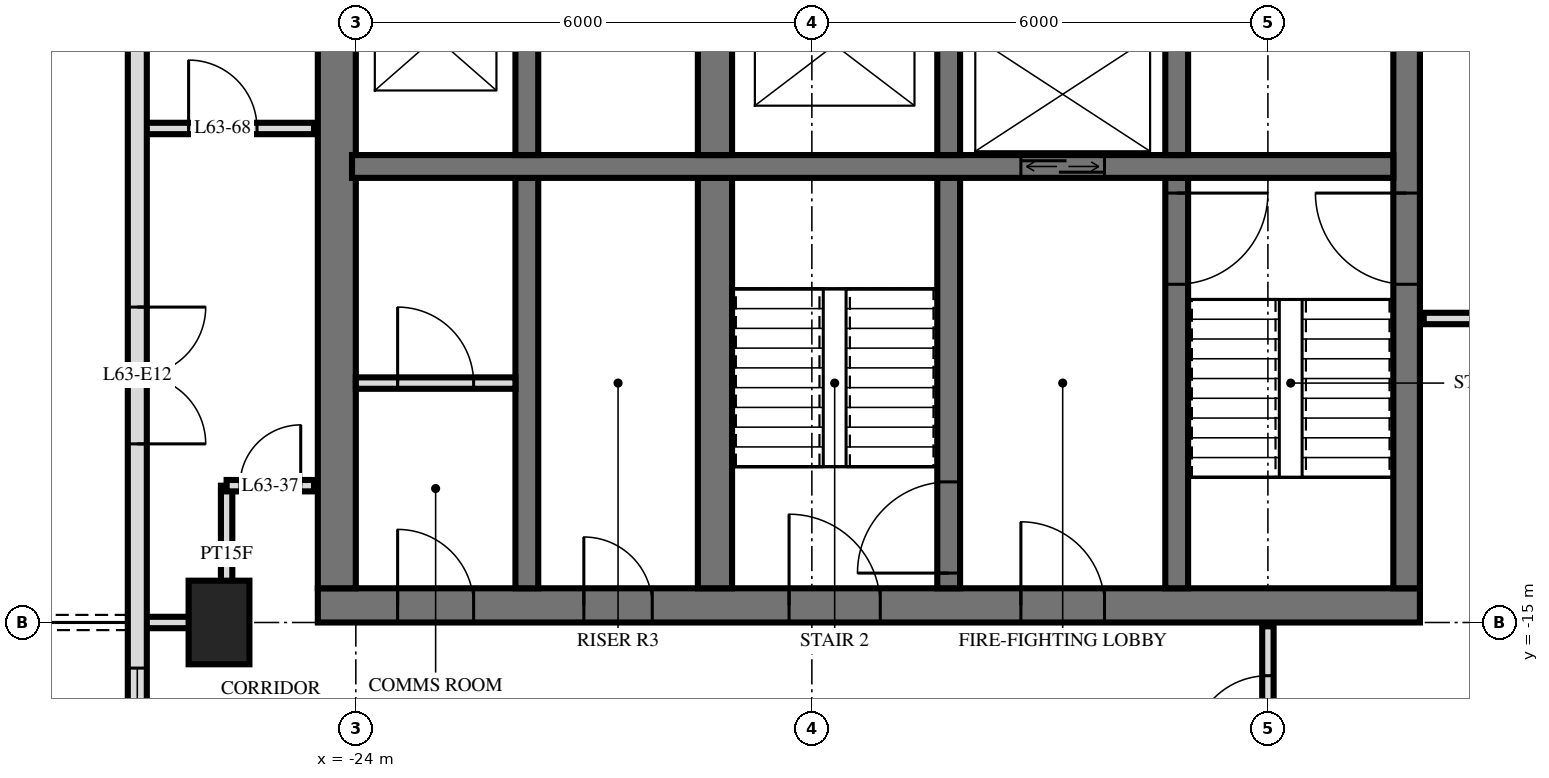
"""IFC4 building model, lengths in metres.
Left out: names, types, materials, properties, quantities, classifications, styles, units other than length and angle.
Written with IfcOpenShell. Run it as: python <this file> out.ifc"""

import sys

from ifc_helpers import new_model, si_unit, direction, frame, frame_2d, origin, origin_2d, place, context, subcontext, project, spatial, rectangle, extrude, element, fill, save


model = new_model("IFC4")
c1 = context("Model", 3, precision=1e-05, world=origin(), true_north=direction((0.0, 1.0)))
c2 = subcontext(c1, "Body", "Model", "MODEL_VIEW")
j1 = project(units=[si_unit("LENGTHUNIT", "METRE"), si_unit("PLANEANGLEUNIT", "RADIAN")], contexts=[c1])
p1 = place(None, origin())
s1 = spatial("IfcSite", under=j1, at=p1, CompositionType="ELEMENT")
p2 = place(p1, origin())
s2 = spatial("IfcBuilding", under=s1, at=p2, CompositionType="ELEMENT")
p3 = place(p2, frame((0.0, 0.0, 239.6)))
s3 = spatial("IfcBuildingStorey", under=s2, at=p3, CompositionType="ELEMENT", Elevation=239.6)
p4 = place(p3, frame((-25.8, -15.0, 0.0), z_axis=(0.0, 0.0, 1.0), x_axis=(0.0, 1.0, 0.0)))
e1 = element("IfcColumn", 1, at=p4, inside=s3, PredefinedType="COLUMN", context=c2, shape_type="SweptSolid", body=[
    extrude(rectangle(XDim=1.1, YDim=0.8, at=origin_2d()), origin(), (0.0, 0.0, 1.0), 3.5),
])
p5 = place(p3, frame((-24.5, -14.775, 0.0), z_axis=(0.0, 0.0, 1.0), x_axis=(1.0, 0.0, 0.0)))
e2 = element("IfcWall", 2, at=p5, inside=s3, PredefinedType="SHEAR", context=c2, shape_type="SweptSolid", body=[
    extrude(rectangle(XDim=14.5, YDim=0.45, at=frame_2d((7.25, 0.0))), origin(), (0.0, 0.0, 1.0), 3.5),
])
p6 = place(p5, frame((6.2, 0.0, 0.0)))
e3 = element("IfcOpeningElement", 3, at=p6, cuts=e2, PredefinedType="OPENING", context=c2, shape_type="SweptSolid", body=[
    extrude(rectangle(XDim=1.2, YDim=2.1, at=frame_2d((0.6, 1.05))), frame((0.0, 0.235, 0.0), z_axis=(0.0, -1.0, 0.0), x_axis=(1.0, 0.0, 0.0)), (0.0, 0.0, 1.0), 0.47),
])
p7 = place(p5, frame((9.25, 0.0, 0.0)))
e4 = element("IfcOpeningElement", 4, at=p7, cuts=e2, PredefinedType="OPENING", context=c2, shape_type="SweptSolid", body=[
    extrude(rectangle(XDim=1.1, YDim=2.1, at=frame_2d((0.55, 1.05))), frame((0.0, 0.235, 0.0), z_axis=(0.0, -1.0, 0.0), x_axis=(1.0, 0.0, 0.0)), (0.0, 0.0, 1.0), 0.47),
])
p8 = place(p5, frame((3.5, 0.0, 0.0)))
e5 = element("IfcOpeningElement", 5, at=p8, cuts=e2, PredefinedType="OPENING", context=c2, shape_type="SweptSolid", body=[
    extrude(rectangle(XDim=0.9, YDim=2.1, at=frame_2d((0.45, 1.05))), frame((0.0, 0.235, 0.0), z_axis=(0.0, -1.0, 0.0), x_axis=(1.0, 0.0, 0.0)), (0.0, 0.0, 1.0), 0.47),
])
p9 = place(p5, frame((1.05, 0.0, 0.0)))
e6 = element("IfcOpeningElement", 6, at=p9, cuts=e2, PredefinedType="OPENING", context=c2, shape_type="SweptSolid", body=[
    extrude(rectangle(XDim=1.0, YDim=2.1, at=frame_2d((0.5, 1.05))), frame((0.0, 0.235, 0.0), z_axis=(0.0, -1.0, 0.0), x_axis=(1.0, 0.0, 0.0)), (0.0, 0.0, 1.0), 0.47),
])
p10 = place(p3, frame((-10.175, -14.55, 0.0), z_axis=(0.0, 0.0, 1.0), x_axis=(0.0, 1.0, 0.0)))
e7 = element("IfcWall", 7, at=p10, inside=s3, PredefinedType="SHEAR", context=c2, shape_type="SweptSolid", body=[
    extrude(rectangle(XDim=14.1, YDim=0.35, at=frame_2d((7.05, 0.0))), origin(), (0.0, 0.0, 1.0), 3.5),
])
p11 = place(p10, frame((8.4, 0.0, 0.0)))
e8 = element("IfcOpeningElement", 8, at=p11, cuts=e7, PredefinedType="OPENING", context=c2, shape_type="SweptSolid", body=[
    extrude(rectangle(XDim=1.4, YDim=2.4, at=frame_2d((0.7, 1.2))), frame((0.0, 0.185, 0.0), z_axis=(0.0, -1.0, 0.0), x_axis=(1.0, 0.0, 0.0)), (0.0, 0.0, 1.0), 0.37),
])
p12 = place(p10, frame((10.0, 0.0, 0.0)))
e9 = element("IfcOpeningElement", 9, at=p12, cuts=e7, PredefinedType="OPENING", context=c2, shape_type="SweptSolid", body=[
    extrude(rectangle(XDim=1.4, YDim=2.4, at=frame_2d((0.7, 1.2))), frame((0.0, 0.185, 0.0), z_axis=(0.0, -1.0, 0.0), x_axis=(1.0, 0.0, 0.0)), (0.0, 0.0, 1.0), 0.37),
])
p13 = place(p10, frame((4.0, 0.0, 0.0)))
e10 = element("IfcOpeningElement", 10, at=p13, cuts=e7, PredefinedType="OPENING", context=c2, shape_type="SweptSolid", body=[
    extrude(rectangle(XDim=1.2, YDim=2.1, at=frame_2d((0.6, 1.05))), frame((0.0, 0.185, 0.0), z_axis=(0.0, -1.0, 0.0), x_axis=(1.0, 0.0, 0.0)), (0.0, 0.0, 1.0), 0.37),
])
p14 = place(p3, frame((-24.25, -14.55, 0.0), z_axis=(0.0, 0.0, 1.0), x_axis=(0.0, 1.0, 0.0)))
e11 = element("IfcWall", 11, at=p14, inside=s3, PredefinedType="SHEAR", context=c2, shape_type="SweptSolid", body=[
    extrude(rectangle(XDim=14.1, YDim=0.5, at=frame_2d((7.05, 0.0))), origin(), (0.0, 0.0, 1.0), 3.5),
])
p15 = place(p3, frame((-24.05, -9.0, 0.0), z_axis=(0.0, 0.0, 1.0), x_axis=(1.0, 0.0, 0.0)))
e12 = element("IfcWall", 12, at=p15, inside=s3, PredefinedType="SHEAR", context=c2, shape_type="SweptSolid", body=[
    extrude(rectangle(XDim=13.7, YDim=0.3, at=frame_2d((6.85, 0.0))), origin(), (0.0, 0.0, 1.0), 3.5),
])
p16 = place(p15, frame((8.8, 0.0, 0.0)))
e13 = element("IfcOpeningElement", 13, at=p16, cuts=e12, PredefinedType="OPENING", context=c2, shape_type="SweptSolid", body=[
    extrude(rectangle(XDim=1.1, YDim=2.1, at=frame_2d((0.55, 1.05))), frame((0.0, 0.16, 0.0), z_axis=(0.0, -1.0, 0.0), x_axis=(1.0, 0.0, 0.0)), (0.0, 0.0, 1.0), 0.32),
])
p17 = place(p3, frame((-13.2, -8.85, 0.0), z_axis=(0.0, 0.0, 1.0), x_axis=(0.0, 1.0, 0.0)))
e14 = element("IfcWall", 14, at=p17, inside=s3, PredefinedType="SHEAR", context=c2, shape_type="SweptSolid", body=[
    extrude(rectangle(XDim=2.3, YDim=0.3, at=frame_2d((1.15, 0.0))), origin(), (0.0, 0.0, 1.0), 3.5),
])
p18 = place(p3, frame((-13.2, -14.55, 0.0), z_axis=(0.0, 0.0, 1.0), x_axis=(0.0, 1.0, 0.0)))
e15 = element("IfcWall", 15, at=p18, inside=s3, PredefinedType="SHEAR", context=c2, shape_type="SweptSolid", body=[
    extrude(rectangle(XDim=5.4, YDim=0.3, at=frame_2d((2.7, 0.0))), origin(), (0.0, 0.0, 1.0), 3.5),
])
p19 = place(p18, frame((4.0, 0.0, 0.0)))
e16 = element("IfcOpeningElement", 16, at=p19, cuts=e15, PredefinedType="OPENING", context=c2, shape_type="SweptSolid", body=[
    extrude(rectangle(XDim=1.2, YDim=2.1, at=frame_2d((0.6, 1.05))), frame((0.0, 0.16, 0.0), z_axis=(0.0, -1.0, 0.0), x_axis=(1.0, 0.0, 0.0)), (0.0, 0.0, 1.0), 0.32),
])
p20 = place(p3, frame((-16.2, -8.85, 0.0), z_axis=(0.0, 0.0, 1.0), x_axis=(0.0, 1.0, 0.0)))
e17 = element("IfcWall", 17, at=p20, inside=s3, PredefinedType="SHEAR", context=c2, shape_type="SweptSolid", body=[
    extrude(rectangle(XDim=2.3, YDim=0.3, at=frame_2d((1.15, 0.0))), origin(), (0.0, 0.0, 1.0), 3.5),
])
p21 = place(p3, frame((-16.2, -14.55, 0.0), z_axis=(0.0, 0.0, 1.0), x_axis=(0.0, 1.0, 0.0)))
e18 = element("IfcWall", 18, at=p21, inside=s3, PredefinedType="SHEAR", context=c2, shape_type="SweptSolid", body=[
    extrude(rectangle(XDim=5.4, YDim=0.3, at=frame_2d((2.7, 0.0))), origin(), (0.0, 0.0, 1.0), 3.5),
])
p22 = place(p21, frame((0.2, 0.0, 0.0)))
e19 = element("IfcOpeningElement", 19, at=p22, cuts=e18, PredefinedType="OPENING", context=c2, shape_type="SweptSolid", body=[
    extrude(rectangle(XDim=1.2, YDim=2.1, at=frame_2d((0.6, 1.05))), frame((0.0, 0.16, 0.0), z_axis=(0.0, -1.0, 0.0), x_axis=(1.0, 0.0, 0.0)), (0.0, 0.0, 1.0), 0.32),
])
p23 = place(p3, frame((-19.275, -8.85, 0.0), z_axis=(0.0, 0.0, 1.0), x_axis=(0.0, 1.0, 0.0)))
e20 = element("IfcWall", 20, at=p23, inside=s3, PredefinedType="SHEAR", context=c2, shape_type="SweptSolid", body=[
    extrude(rectangle(XDim=2.3, YDim=0.45, at=frame_2d((1.15, 0.0))), origin(), (0.0, 0.0, 1.0), 3.5),
])
p24 = place(p3, frame((-19.275, -14.55, 0.0), z_axis=(0.0, 0.0, 1.0), x_axis=(0.0, 1.0, 0.0)))
e21 = element("IfcWall", 21, at=p24, inside=s3, PredefinedType="SHEAR", context=c2, shape_type="SweptSolid", body=[
    extrude(rectangle(XDim=5.4, YDim=0.45, at=frame_2d((2.7, 0.0))), origin(), (0.0, 0.0, 1.0), 3.5),
])
p25 = place(p3, frame((-21.75, -8.85, 0.0), z_axis=(0.0, 0.0, 1.0), x_axis=(0.0, 1.0, 0.0)))
e22 = element("IfcWall", 22, at=p25, inside=s3, PredefinedType="SHEAR", context=c2, shape_type="SweptSolid", body=[
    extrude(rectangle(XDim=2.3, YDim=0.3, at=frame_2d((1.15, 0.0))), origin(), (0.0, 0.0, 1.0), 3.5),
])
p26 = place(p3, frame((-21.75, -14.55, 0.0), z_axis=(0.0, 0.0, 1.0), x_axis=(0.0, 1.0, 0.0)))
e23 = element("IfcWall", 23, at=p26, inside=s3, PredefinedType="SHEAR", context=c2, shape_type="SweptSolid", body=[
    extrude(rectangle(XDim=5.4, YDim=0.3, at=frame_2d((2.7, 0.0))), origin(), (0.0, 0.0, 1.0), 3.5),
])
p27 = place(p3, frame((-26.875, -3.325, 0.0), z_axis=(0.0, 0.0, 1.0), x_axis=(0.0, -1.0, 0.0)))
e24 = element("IfcWall", 24, at=p27, inside=s3, PredefinedType="SOLIDWALL", context=c2, shape_type="SweptSolid", body=[
    extrude(rectangle(XDim=21.551, YDim=0.25, at=frame_2d((10.775, 0.0))), origin(), (0.0, 0.0, 1.0), 3.22),
])
p28 = place(p27, frame((7.525, 0.0, 0.0)))
e25 = element("IfcOpeningElement", 25, at=p28, cuts=e24, PredefinedType="OPENING", context=c2, shape_type="SweptSolid", body=[
    extrude(rectangle(XDim=1.8, YDim=2.4, at=frame_2d((0.9, 1.2))), frame((0.0, 0.135, 0.0), z_axis=(0.0, -1.0, 0.0), x_axis=(1.0, 0.0, 0.0)), (0.0, 0.0, 1.0), 0.27),
])
p29 = place(p27, frame((12.275, 0.0, 0.9)))
e26 = element("IfcOpeningElement", 26, at=p29, cuts=e24, PredefinedType="OPENING", context=c2, shape_type="SweptSolid", body=[
    extrude(rectangle(XDim=1.2, YDim=1.5, at=frame_2d((0.6, 0.75))), frame((0.0, 0.135, 0.0), z_axis=(0.0, -1.0, 0.0), x_axis=(1.0, 0.0, 0.0)), (0.0, 0.0, 1.0), 0.27),
])
p30 = place(p27, frame((15.275, 0.0, 0.0)))
e27 = element("IfcOpeningElement", 27, at=p30, cuts=e24, PredefinedType="OPENING", context=c2, shape_type="SweptSolid", body=[
    extrude(rectangle(XDim=1.8, YDim=2.4, at=frame_2d((0.9, 1.2))), frame((0.0, 0.135, 0.0), z_axis=(0.0, -1.0, 0.0), x_axis=(1.0, 0.0, 0.0)), (0.0, 0.0, 1.0), 0.27),
])
p31 = place(p27, frame((18.875, 0.0, 0.0)))
e28 = element("IfcOpeningElement", 28, at=p31, cuts=e24, PredefinedType="OPENING", context=c2, shape_type="SweptSolid", body=[
    extrude(rectangle(XDim=1.8, YDim=2.4, at=frame_2d((0.9, 1.2))), frame((0.0, 0.135, 0.0), z_axis=(0.0, -1.0, 0.0), x_axis=(1.0, 0.0, 0.0)), (0.0, 0.0, 1.0), 0.27),
])
p32 = place(p3, frame((-24.0, -11.85, 0.0), z_axis=(0.0, 0.0, 1.0), x_axis=(1.0, 0.0, 0.0)))
e29 = element("IfcWall", 29, at=p32, inside=s3, PredefinedType="PARTITIONING", context=c2, shape_type="SweptSolid", body=[
    extrude(rectangle(XDim=2.1, YDim=0.15, at=frame_2d((1.05, 0.0))), origin(), (0.0, 0.0, 1.0), 3.2),
])
p33 = place(p32, frame((0.55, 0.0, 0.0)))
e30 = element("IfcOpeningElement", 30, at=p33, cuts=e29, PredefinedType="OPENING", context=c2, shape_type="SweptSolid", body=[
    extrude(rectangle(XDim=1.0, YDim=2.1, at=frame_2d((0.5, 1.05))), frame((0.0, 0.085, 0.0), z_axis=(0.0, -1.0, 0.0), x_axis=(1.0, 0.0, 0.0)), (0.0, 0.0, 1.0), 0.17),
])
p34 = place(p3, frame((-12.0, -17.4, 0.0), z_axis=(0.0, 0.0, 1.0), x_axis=(0.0, 1.0, 0.0)))
e31 = element("IfcWall", 31, at=p34, inside=s3, PredefinedType="PARTITIONING", context=c2, shape_type="SweptSolid", body=[
    extrude(rectangle(XDim=2.35, YDim=0.15, at=frame_2d((1.175, 0.0))), origin(), (0.0, 0.0, 1.0), 3.22),
])
p35 = place(p34, frame((0.7, 0.0, 0.0)))
e32 = element("IfcOpeningElement", 32, at=p35, cuts=e31, PredefinedType="OPENING", context=c2, shape_type="SweptSolid", body=[
    extrude(rectangle(XDim=1.0, YDim=2.1, at=frame_2d((0.5, 1.05))), frame((0.0, 0.085, 0.0), z_axis=(0.0, -1.0, 0.0), x_axis=(1.0, 0.0, 0.0)), (0.0, 0.0, 1.0), 0.17),
])
p36 = place(p3, frame((-25.7, -15.0, 0.0), z_axis=(0.0, 0.0, 1.0), x_axis=(0.0, 1.0, 0.0)))
e33 = element("IfcWall", 33, at=p36, inside=s3, PredefinedType="PARTITIONING", context=c2, shape_type="SweptSolid", body=[
    extrude(rectangle(XDim=1.8, YDim=0.15, at=frame_2d((0.9, 0.0))), origin(), (0.0, 0.0, 1.0), 3.22),
])
p37 = place(p3, frame((-26.82, -15.0, 0.0), z_axis=(0.0, 0.0, 1.0), x_axis=(1.0, 0.0, 0.0)))
e34 = element("IfcWall", 34, at=p37, inside=s3, PredefinedType="PARTITIONING", context=c2, shape_type="SweptSolid", body=[
    extrude(rectangle(XDim=1.12, YDim=0.15, at=frame_2d((0.56, 0.0))), origin(), (0.0, 0.0, 1.0), 3.22),
])
p38 = place(p3, frame((-25.7, -13.2, 0.0), z_axis=(0.0, 0.0, 1.0), x_axis=(1.0, 0.0, 0.0)))
e35 = element("IfcWall", 35, at=p38, inside=s3, PredefinedType="PARTITIONING", context=c2, shape_type="SweptSolid", body=[
    extrude(rectangle(XDim=1.15, YDim=0.15, at=frame_2d((0.575, 0.0))), origin(), (0.0, 0.0, 1.0), 3.22),
])
p39 = place(p38, frame((0.175, 0.0, 0.0)))
e36 = element("IfcOpeningElement", 36, at=p39, cuts=e35, PredefinedType="OPENING", context=c2, shape_type="SweptSolid", body=[
    extrude(rectangle(XDim=0.8, YDim=2.1, at=frame_2d((0.4, 1.05))), frame((0.0, 0.085, 0.0), z_axis=(0.0, -1.0, 0.0), x_axis=(1.0, 0.0, 0.0)), (0.0, 0.0, 1.0), 0.17),
])
p40 = place(p3, frame((-9.95, -11.0, 0.0), z_axis=(0.0, 0.0, 1.0), x_axis=(1.0, 0.0, 0.0)))
e37 = element("IfcWall", 37, at=p40, inside=s3, PredefinedType="PARTITIONING", context=c2, shape_type="SweptSolid", body=[
    extrude(rectangle(XDim=19.9, YDim=0.15, at=frame_2d((9.95, 0.0))), origin(), (0.0, 0.0, 1.0), 3.22),
])
p41 = place(p40, frame((9.45, 0.0, 0.0)))
e38 = element("IfcOpeningElement", 38, at=p41, cuts=e37, PredefinedType="OPENING", context=c2, shape_type="SweptSolid", body=[
    extrude(rectangle(XDim=1.0, YDim=2.1, at=frame_2d((0.5, 1.05))), frame((0.0, 0.085, 0.0), z_axis=(0.0, -1.0, 0.0), x_axis=(1.0, 0.0, 0.0)), (0.0, 0.0, 1.0), 0.17),
])
p42 = place(p40, frame((3.45, 0.0, 0.0)))
e39 = element("IfcOpeningElement", 39, at=p42, cuts=e37, PredefinedType="OPENING", context=c2, shape_type="SweptSolid", body=[
    extrude(rectangle(XDim=1.0, YDim=2.1, at=frame_2d((0.5, 1.05))), frame((0.0, 0.085, 0.0), z_axis=(0.0, -1.0, 0.0), x_axis=(1.0, 0.0, 0.0)), (0.0, 0.0, 1.0), 0.17),
])
p43 = place(p3, frame((-26.82, -8.5, 0.0), z_axis=(0.0, 0.0, 1.0), x_axis=(1.0, 0.0, 0.0)))
e40 = element("IfcWall", 40, at=p43, inside=s3, PredefinedType="PARTITIONING", context=c2, shape_type="SweptSolid", body=[
    extrude(rectangle(XDim=2.27, YDim=0.15, at=frame_2d((1.135, 0.0))), origin(), (0.0, 0.0, 1.0), 3.22),
])
p44 = place(p43, frame((0.62, 0.0, 0.0)))
e41 = element("IfcOpeningElement", 41, at=p44, cuts=e40, PredefinedType="OPENING", context=c2, shape_type="SweptSolid", body=[
    extrude(rectangle(XDim=0.9, YDim=2.1, at=frame_2d((0.45, 1.05))), frame((0.0, 0.085, 0.0), z_axis=(0.0, -1.0, 0.0), x_axis=(1.0, 0.0, 0.0)), (0.0, 0.0, 1.0), 0.17),
])
p45 = place(p28, origin())
e42 = element("IfcDoor", 42, at=p45, inside=s3, OperationType="DOUBLE_DOOR_SINGLE_SWING", PredefinedType="DOOR", context=c2, shape_type="SweptSolid", body=[
    extrude(rectangle(XDim=1.8, YDim=2.4, at=frame_2d((0.9, 1.2))), frame((0.0, 0.025, 0.0), z_axis=(0.0, -1.0, 0.0), x_axis=(1.0, 0.0, 0.0)), (0.0, 0.0, 1.0), 0.05),
])
fill(e25, e42)
p46 = place(p29, origin())
e43 = element("IfcWindow", 43, at=p46, inside=s3, PartitioningType="SINGLE_PANEL", PredefinedType="WINDOW", context=c2, shape_type="SweptSolid", body=[
    extrude(rectangle(XDim=1.2, YDim=1.5, at=frame_2d((0.6, 0.75))), frame((0.0, 0.03, 0.0), z_axis=(0.0, -1.0, 0.0), x_axis=(1.0, 0.0, 0.0)), (0.0, 0.0, 1.0), 0.06),
])
fill(e26, e43)
p47 = place(p16, origin())
e44 = element("IfcDoor", 44, at=p47, inside=s3, OperationType="DOUBLE_DOOR_SLIDING", PredefinedType="USERDEFINED", context=c2, shape_type="SweptSolid", body=[
    extrude(rectangle(XDim=1.1, YDim=2.1, at=frame_2d((0.55, 1.05))), frame((0.0, 0.025, 0.0), z_axis=(0.0, -1.0, 0.0), x_axis=(1.0, 0.0, 0.0)), (0.0, 0.0, 1.0), 0.05),
])
fill(e13, e44)
p48 = place(p13, origin())
e45 = element("IfcDoor", 45, at=p48, inside=s3, OperationType="SINGLE_SWING_LEFT", PredefinedType="DOOR", context=c2, shape_type="SweptSolid", body=[
    extrude(rectangle(XDim=1.2, YDim=2.1, at=frame_2d((0.6, 1.05))), frame((0.0, 0.025, 0.0), z_axis=(0.0, -1.0, 0.0), x_axis=(1.0, 0.0, 0.0)), (0.0, 0.0, 1.0), 0.05),
])
fill(e10, e45)
p49 = place(p6, origin())
e46 = element("IfcDoor", 46, at=p49, inside=s3, OperationType="SINGLE_SWING_RIGHT", PredefinedType="DOOR", context=c2, shape_type="SweptSolid", body=[
    extrude(rectangle(XDim=1.2, YDim=2.1, at=frame_2d((0.6, 1.05))), frame((0.0, 0.025, 0.0), z_axis=(0.0, -1.0, 0.0), x_axis=(1.0, 0.0, 0.0)), (0.0, 0.0, 1.0), 0.05),
])
fill(e3, e46)
p50 = place(p7, origin())
e47 = element("IfcDoor", 47, at=p50, inside=s3, OperationType="SINGLE_SWING_RIGHT", PredefinedType="DOOR", context=c2, shape_type="SweptSolid", body=[
    extrude(rectangle(XDim=1.1, YDim=2.1, at=frame_2d((0.55, 1.05))), frame((0.0, 0.025, 0.0), z_axis=(0.0, -1.0, 0.0), x_axis=(1.0, 0.0, 0.0)), (0.0, 0.0, 1.0), 0.05),
])
fill(e4, e47)
p51 = place(p8, origin())
e48 = element("IfcDoor", 48, at=p51, inside=s3, OperationType="SINGLE_SWING_RIGHT", PredefinedType="DOOR", context=c2, shape_type="SweptSolid", body=[
    extrude(rectangle(XDim=0.9, YDim=2.1, at=frame_2d((0.45, 1.05))), frame((0.0, 0.025, 0.0), z_axis=(0.0, -1.0, 0.0), x_axis=(1.0, 0.0, 0.0)), (0.0, 0.0, 1.0), 0.05),
])
fill(e5, e48)
p52 = place(p9, origin())
e49 = element("IfcDoor", 49, at=p52, inside=s3, OperationType="SINGLE_SWING_RIGHT", PredefinedType="DOOR", context=c2, shape_type="SweptSolid", body=[
    extrude(rectangle(XDim=1.0, YDim=2.1, at=frame_2d((0.5, 1.05))), frame((0.0, 0.025, 0.0), z_axis=(0.0, -1.0, 0.0), x_axis=(1.0, 0.0, 0.0)), (0.0, 0.0, 1.0), 0.05),
])
fill(e6, e49)
p53 = place(p19, frame((0.6, 0.0, 0.0), z_axis=(0.0, 0.0, 1.0), x_axis=(-1.0, 0.0, 0.0)))
e50 = element("IfcDoor", 50, at=p53, inside=s3, OperationType="SINGLE_SWING_RIGHT", PredefinedType="DOOR", context=c2, shape_type="SweptSolid", body=[
    extrude(rectangle(XDim=1.2, YDim=2.1, at=frame_2d((0.0, 1.05))), frame((0.0, -0.025, 0.0), z_axis=(0.0, 1.0, 0.0), x_axis=(-1.0, 0.0, 0.0)), (0.0, 0.0, 1.0), 0.05),
])
fill(e16, e50)
p54 = place(p22, origin())
e51 = element("IfcDoor", 51, at=p54, inside=s3, OperationType="SINGLE_SWING_RIGHT", PredefinedType="DOOR", context=c2, shape_type="SweptSolid", body=[
    extrude(rectangle(XDim=1.2, YDim=2.1, at=frame_2d((0.6, 1.05))), frame((0.0, 0.025, 0.0), z_axis=(0.0, -1.0, 0.0), x_axis=(1.0, 0.0, 0.0)), (0.0, 0.0, 1.0), 0.05),
])
fill(e19, e51)
p55 = place(p33, origin())
e52 = element("IfcDoor", 52, at=p55, inside=s3, OperationType="SINGLE_SWING_RIGHT", PredefinedType="DOOR", context=c2, shape_type="SweptSolid", body=[
    extrude(rectangle(XDim=1.0, YDim=2.1, at=frame_2d((0.5, 1.05))), frame((0.0, 0.025, 0.0), z_axis=(0.0, -1.0, 0.0), x_axis=(1.0, 0.0, 0.0)), (0.0, 0.0, 1.0), 0.05),
])
fill(e30, e52)
p56 = place(p35, origin())
e53 = element("IfcDoor", 53, at=p56, inside=s3, OperationType="SINGLE_SWING_RIGHT", PredefinedType="DOOR", context=c2, shape_type="SweptSolid", body=[
    extrude(rectangle(XDim=1.0, YDim=2.1, at=frame_2d((0.5, 1.05))), frame((0.0, 0.025, 0.0), z_axis=(0.0, -1.0, 0.0), x_axis=(1.0, 0.0, 0.0)), (0.0, 0.0, 1.0), 0.05),
])
fill(e32, e53)
p57 = place(p39, origin())
e54 = element("IfcDoor", 54, at=p57, inside=s3, OperationType="SINGLE_SWING_LEFT", PredefinedType="DOOR", context=c2, shape_type="SweptSolid", body=[
    extrude(rectangle(XDim=0.8, YDim=2.1, at=frame_2d((0.4, 1.05))), frame((0.0, 0.025, 0.0), z_axis=(0.0, -1.0, 0.0), x_axis=(1.0, 0.0, 0.0)), (0.0, 0.0, 1.0), 0.05),
])
fill(e36, e54)
p58 = place(p44, origin())
e55 = element("IfcDoor", 55, at=p58, inside=s3, OperationType="SINGLE_SWING_RIGHT", PredefinedType="DOOR", context=c2, shape_type="SweptSolid", body=[
    extrude(rectangle(XDim=0.9, YDim=2.1, at=frame_2d((0.45, 1.05))), frame((0.0, 0.025, 0.0), z_axis=(0.0, -1.0, 0.0), x_axis=(1.0, 0.0, 0.0)), (0.0, 0.0, 1.0), 0.05),
])
fill(e41, e55)
save(model, sys.argv[1])
